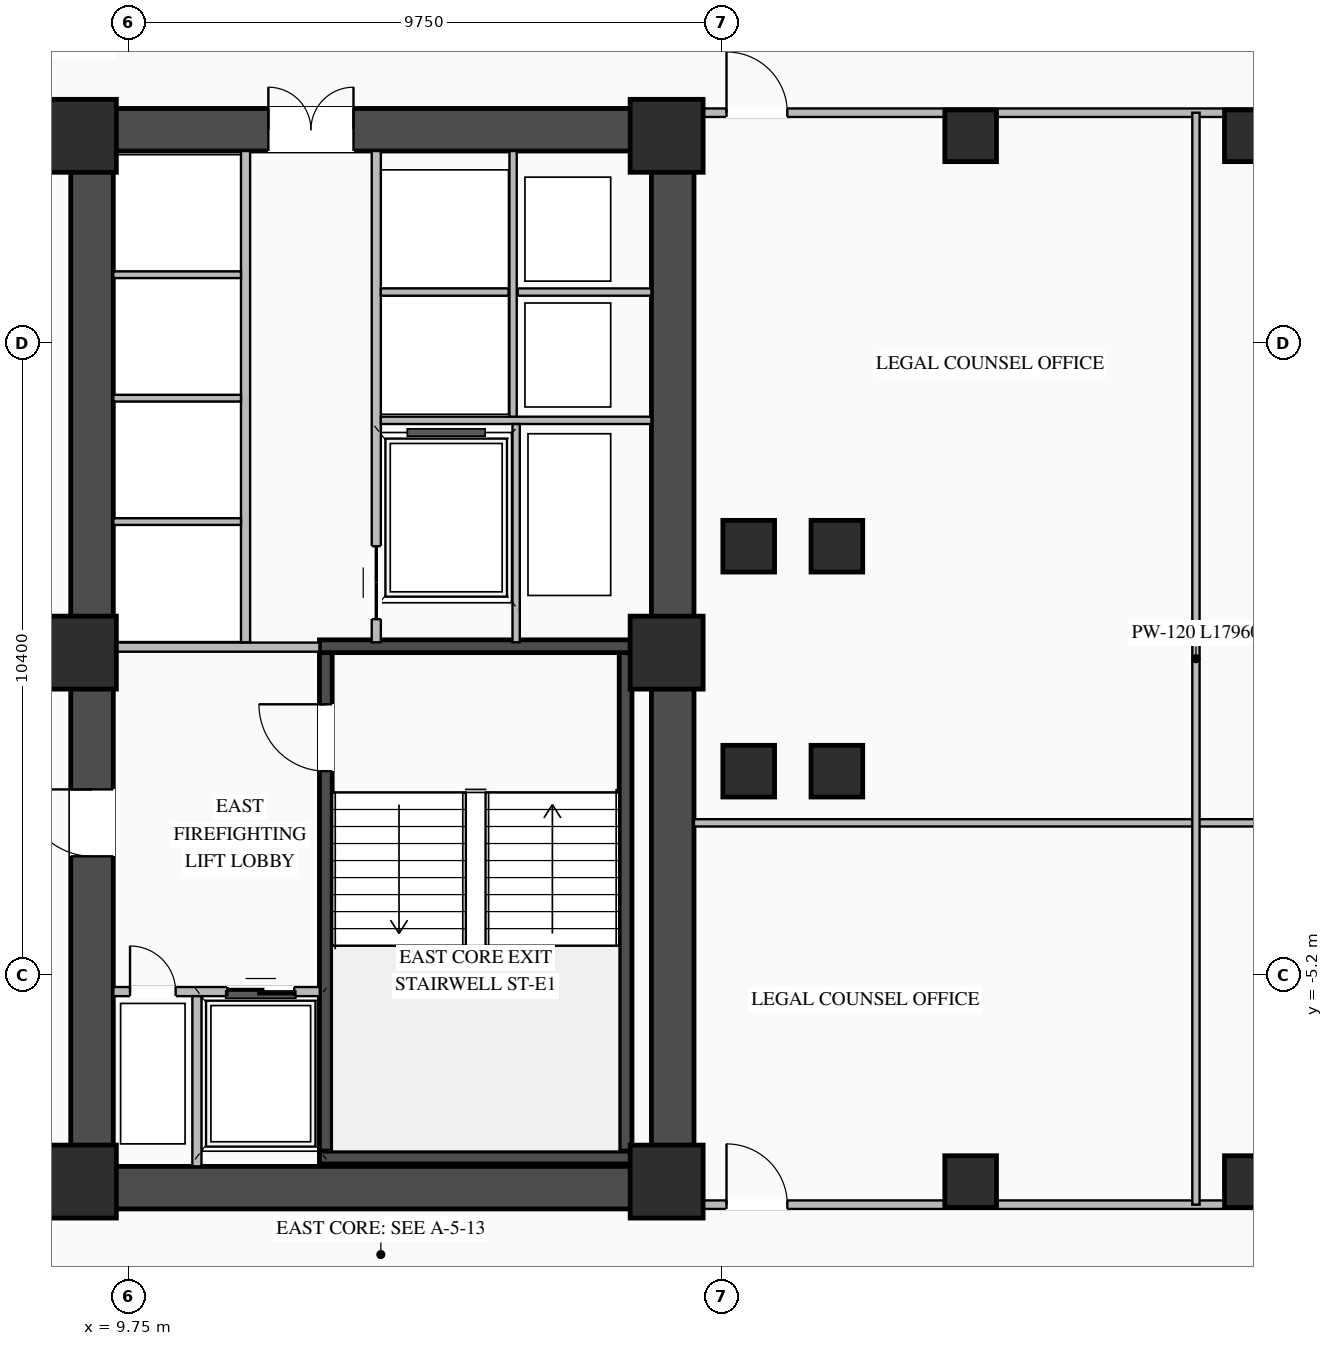
"""IFC4 building model, lengths in metres.
Left out: names, types, materials, properties, quantities, classifications, styles, units other than length and angle.
Written with IfcOpenShell. Run it as: python <this file> out.ifc"""

import sys

from ifc_helpers import new_model, si_unit, direction, frame, frame_2d, origin, origin_2d, place, context, subcontext, project, spatial, rectangle, i_section, extrude, element, fill, save


model = new_model("IFC4")
c1 = context("Model", 3, precision=1e-05, world=origin(), true_north=direction((0.0, 1.0)))
c2 = subcontext(c1, "Body", "Model", "MODEL_VIEW")
j1 = project(units=[si_unit("LENGTHUNIT", "METRE"), si_unit("PLANEANGLEUNIT", "RADIAN")], contexts=[c1])
p1 = place(None, origin())
s1 = spatial("IfcSite", under=j1, at=p1, CompositionType="ELEMENT")
p2 = place(p1, origin())
s2 = spatial("IfcBuilding", under=s1, at=p2, CompositionType="ELEMENT")
p3 = place(p2, frame((0.0, 0.0, 31.2)))
s3 = spatial("IfcBuildingStorey", under=s2, at=p3, CompositionType="ELEMENT", Elevation=31.2)
p4 = place(p3, frame((8.8, -8.7, 0.0), z_axis=(0.0, 0.0, 1.0), x_axis=(1.0, 0.0, 0.0)))
e1 = element("IfcWall", 1, at=p4, inside=s3, PredefinedType="SHEAR", context=c2, shape_type="SweptSolid", body=[
    extrude(rectangle(XDim=10.25, YDim=0.7, at=frame_2d((5.125, 0.0))), origin(), (0.0, 0.0, 1.0), 3.27),
])
p5 = place(p3, frame((8.8, 8.7, 0.0), z_axis=(0.0, 0.0, 1.0), x_axis=(1.0, 0.0, 0.0)))
e2 = element("IfcWall", 2, at=p5, inside=s3, PredefinedType="SHEAR", context=c2, shape_type="SweptSolid", body=[
    extrude(rectangle(XDim=10.25, YDim=0.7, at=frame_2d((5.125, 0.0))), origin(), (0.0, 0.0, 1.0), 3.27),
])
p6 = place(p5, frame((3.25, 0.0, 0.0)))
e3 = element("IfcOpeningElement", 3, at=p6, cuts=e2, PredefinedType="OPENING", context=c2, shape_type="SweptSolid", body=[
    extrude(rectangle(XDim=1.4, YDim=2.05, at=frame_2d((0.7, 1.025))), frame((0.0, 0.36, 0.0), z_axis=(0.0, -1.0, 0.0), x_axis=(1.0, 0.0, 0.0)), (0.0, 0.0, 1.0), 0.72),
])
p7 = place(p3, frame((9.15, -8.35, 0.0), z_axis=(0.0, 0.0, 1.0), x_axis=(0.0, 1.0, 0.0)))
e4 = element("IfcWall", 4, at=p7, inside=s3, PredefinedType="SHEAR", context=c2, shape_type="SweptSolid", body=[
    extrude(rectangle(XDim=16.7, YDim=0.7, at=frame_2d((8.35, 0.0))), origin(), (0.0, 0.0, 1.0), 3.27),
])
p8 = place(p7, frame((5.1, 0.0, 0.0)))
e5 = element("IfcOpeningElement", 5, at=p8, cuts=e4, PredefinedType="OPENING", context=c2, shape_type="SweptSolid", body=[
    extrude(rectangle(XDim=1.1, YDim=2.08, at=frame_2d((0.55, 1.04))), frame((0.0, 0.36, 0.0), z_axis=(0.0, -1.0, 0.0), x_axis=(1.0, 0.0, 0.0)), (0.0, 0.0, 1.0), 0.72),
])
p9 = place(p3, frame((18.7, -8.35, 0.0), z_axis=(0.0, 0.0, 1.0), x_axis=(0.0, 1.0, 0.0)))
e6 = element("IfcWall", 6, at=p9, inside=s3, PredefinedType="SHEAR", context=c2, shape_type="SweptSolid", body=[
    extrude(rectangle(XDim=16.7, YDim=0.7, at=frame_2d((8.35, 0.0))), origin(), (0.0, 0.0, 1.0), 3.27),
])
p10 = place(p3, frame((12.995, -8.1, 0.0), z_axis=(0.0, 0.0, 1.0), x_axis=(0.0, 1.0, 0.0)))
e7 = element("IfcWall", 7, at=p10, inside=s3, PredefinedType="SHEAR", context=c2, shape_type="SweptSolid", body=[
    extrude(rectangle(XDim=8.2, YDim=0.21, at=frame_2d((4.1, 0.0))), origin(), (0.0, 0.0, 1.0), 3.27),
])
p11 = place(p10, frame((6.25, 0.0, 0.0)))
e8 = element("IfcOpeningElement", 8, at=p11, cuts=e7, PredefinedType="OPENING", context=c2, shape_type="SweptSolid", body=[
    extrude(rectangle(XDim=1.1, YDim=2.15, at=frame_2d((0.55, 1.075))), frame((0.0, 0.115, 0.0), z_axis=(0.0, -1.0, 0.0), x_axis=(1.0, 0.0, 0.0)), (0.0, 0.0, 1.0), 0.23),
])
p12 = place(p3, frame((17.925, -8.1, 0.0), z_axis=(0.0, 0.0, 1.0), x_axis=(0.0, 1.0, 0.0)))
e9 = element("IfcWall", 9, at=p12, inside=s3, PredefinedType="SHEAR", context=c2, shape_type="SweptSolid", body=[
    extrude(rectangle(XDim=8.2, YDim=0.21, at=frame_2d((4.1, 0.0))), origin(), (0.0, 0.0, 1.0), 3.27),
])
for number, where, z_axis, x_axis in (
    (10, (12.89, -8.205, 0.0), (0.0, 0.0, 1.0), (1.0, 0.0, 0.0)),
    (11, (18.03, 0.205, 0.0), (0.0, 0.0, 1.0), (-1.0, 0.0, 0.0)),
):
    element("IfcWall", number, at=place(p3, frame(where, z_axis=z_axis, x_axis=x_axis)), inside=s3, PredefinedType="SHEAR", context=c2, shape_type="SweptSolid", body=[
        extrude(rectangle(XDim=5.14, YDim=0.21, at=frame_2d((2.57, 0.0))), origin(), (0.0, 0.0, 1.0), 3.27),
    ])
for number, where, z_axis, x_axis in (
    (12, (8.95, -8.6, 0.0), (0.0, 0.0, 1.0), (1.0, 0.0, 0.0)),
    (13, (8.95, 0.1, 0.0), (0.0, 0.0, 1.0), (1.0, 0.0, 0.0)),
    (14, (8.95, 8.6, 0.0), (0.0, 0.0, 1.0), (1.0, 0.0, 0.0)),
    (15, (18.6, -8.6, 0.0), (0.0, 0.0, 1.0), (1.0, 0.0, 0.0)),
    (16, (18.6, 0.1, 0.0), (0.0, 0.0, 1.0), (1.0, 0.0, 0.0)),
    (17, (18.6, 8.6, 0.0), (0.0, 0.0, 1.0), (1.0, 0.0, 0.0)),
):
    element("IfcColumn", number, at=place(p3, frame(where, z_axis=z_axis, x_axis=x_axis)), inside=s3, PredefinedType="COLUMN", context=c2, shape_type="SweptSolid", body=[
        extrude(rectangle(XDim=1.2, YDim=1.2, at=origin_2d()), origin(), (0.0, 0.0, 1.0), 3.45),
    ])
for number, where, z_axis, x_axis in (
    (18, (19.95, -1.85, 0.0), (0.0, 0.0, 1.0), (1.0, 0.0, 0.0)),
    (19, (19.95, 1.85, 0.0), (0.0, 0.0, 1.0), (1.0, 0.0, 0.0)),
    (20, (21.4, -1.85, 0.0), (0.0, 0.0, 1.0), (1.0, 0.0, 0.0)),
    (21, (21.4, 1.85, 0.0), (0.0, 0.0, 1.0), (1.0, 0.0, 0.0)),
    (22, (23.6, -8.6, 0.0), (0.0, 0.0, 1.0), (1.0, 0.0, 0.0)),
    (23, (23.6, 8.6, 0.0), (0.0, 0.0, 1.0), (1.0, 0.0, 0.0)),
    (24, (28.2, -8.6, 0.0), (0.0, 0.0, 1.0), (1.0, 0.0, 0.0)),
    (25, (28.2, 8.6, 0.0), (0.0, 0.0, 1.0), (1.0, 0.0, 0.0)),
):
    element("IfcColumn", number, at=place(p3, frame(where, z_axis=z_axis, x_axis=x_axis)), inside=s3, PredefinedType="COLUMN", context=c2, shape_type="SweptSolid", body=[
        extrude(i_section(OverallWidth=0.85, OverallDepth=0.85, WebThickness=0.032, FlangeThickness=0.048, at=origin_2d()), origin(), (0.0, 0.0, 1.0), 3.45),
    ])
p13 = place(p3, frame((9.5, -5.475, 0.0), z_axis=(0.0, 0.0, 1.0), x_axis=(1.0, 0.0, 0.0)))
e26 = element("IfcWall", 26, at=p13, inside=s3, PredefinedType="STANDARD", context=c2, shape_type="SweptSolid", body=[
    extrude(rectangle(XDim=3.395, YDim=0.15, at=frame_2d((1.698, 0.0))), origin(), (0.0, 0.0, 1.0), 3.25),
])
p14 = place(p13, frame((1.875, 0.0, 0.0)))
e27 = element("IfcOpeningElement", 27, at=p14, cuts=e26, PredefinedType="OPENING", context=c2, shape_type="SweptSolid", body=[
    extrude(rectangle(XDim=1.1, YDim=2.15, at=frame_2d((0.55, 1.075))), frame((0.0, 0.085, 0.0), z_axis=(0.0, -1.0, 0.0), x_axis=(1.0, 0.0, 0.0)), (0.0, 0.0, 1.0), 0.17),
])
p15 = place(p13, frame((0.275, 0.0, 0.0)))
e28 = element("IfcOpeningElement", 28, at=p15, cuts=e26, PredefinedType="OPENING", context=c2, shape_type="SweptSolid", body=[
    extrude(rectangle(XDim=0.75, YDim=2.05, at=frame_2d((0.375, 1.025))), frame((0.0, 0.085, 0.0), z_axis=(0.0, -1.0, 0.0), x_axis=(1.0, 0.0, 0.0)), (0.0, 0.0, 1.0), 0.17),
])
p16 = place(p3, frame((10.875, -8.35, 0.0), z_axis=(0.0, 0.0, 1.0), x_axis=(0.0, 1.0, 0.0)))
e29 = element("IfcWall", 29, at=p16, inside=s3, PredefinedType="STANDARD", context=c2, shape_type="SweptSolid", body=[
    extrude(rectangle(XDim=2.8, YDim=0.15, at=frame_2d((1.4, 0.0))), origin(), (0.0, 0.0, 1.0), 3.25),
])
p17 = place(p3, frame((9.5, 0.19, 0.0), z_axis=(0.0, 0.0, 1.0), x_axis=(1.0, 0.0, 0.0)))
e30 = element("IfcWall", 30, at=p17, inside=s3, PredefinedType="STANDARD", context=c2, shape_type="SweptSolid", body=[
    extrude(rectangle(XDim=3.39, YDim=0.15, at=frame_2d((1.695, 0.0))), origin(), (0.0, 0.0, 1.0), 2.645),
])
p18 = place(p3, frame((11.675, 0.27, 0.0), z_axis=(0.0, 0.0, 1.0), x_axis=(0.0, 1.0, 0.0)))
e31 = element("IfcWall", 31, at=p18, inside=s3, PredefinedType="STANDARD", context=c2, shape_type="SweptSolid", body=[
    extrude(rectangle(XDim=8.08, YDim=0.15, at=frame_2d((4.04, 0.0))), origin(), (0.0, 0.0, 1.0), 3.25),
])
for number, where, z_axis, x_axis in (
    (32, (9.5, 2.255, 0.0), (0.0, 0.0, 1.0), (1.0, 0.0, 0.0)),
    (33, (9.5, 4.285, 0.0), (0.0, 0.0, 1.0), (1.0, 0.0, 0.0)),
    (34, (9.5, 6.315, 0.0), (0.0, 0.0, 1.0), (1.0, 0.0, 0.0)),
):
    element("IfcWall", number, at=place(p3, frame(where, z_axis=z_axis, x_axis=x_axis)), inside=s3, PredefinedType="STANDARD", context=c2, shape_type="SweptSolid", body=[
        extrude(rectangle(XDim=2.1, YDim=0.11, at=frame_2d((1.05, 0.0))), origin(), (0.0, 0.0, 1.0), 3.25),
    ])
p19 = place(p3, frame((13.825, 0.27, 0.0), z_axis=(0.0, 0.0, 1.0), x_axis=(0.0, 1.0, 0.0)))
e35 = element("IfcWall", 35, at=p19, inside=s3, PredefinedType="STANDARD", context=c2, shape_type="SweptSolid", body=[
    extrude(rectangle(XDim=8.08, YDim=0.15, at=frame_2d((4.04, 0.0))), origin(), (0.0, 0.0, 1.0), 3.25),
])
p20 = place(p19, frame((0.38, 0.0, 0.0)))
e36 = element("IfcOpeningElement", 36, at=p20, cuts=e35, PredefinedType="OPENING", context=c2, shape_type="SweptSolid", body=[
    extrude(rectangle(XDim=1.2, YDim=2.1, at=frame_2d((0.6, 1.05))), frame((0.0, 0.085, 0.0), z_axis=(0.0, -1.0, 0.0), x_axis=(1.0, 0.0, 0.0)), (0.0, 0.0, 1.0), 0.17),
])
p21 = place(p3, frame((13.9, 3.92, 0.0), z_axis=(0.0, 0.0, 1.0), x_axis=(1.0, 0.0, 0.0)))
e37 = element("IfcWall", 37, at=p21, inside=s3, PredefinedType="STANDARD", context=c2, shape_type="SweptSolid", body=[
    extrude(rectangle(XDim=4.45, YDim=0.12, at=frame_2d((2.225, 0.0))), origin(), (0.0, 0.0, 1.0), 3.25),
])
p22 = place(p3, frame((16.15, 6.03, 0.0), z_axis=(0.0, 0.0, 1.0), x_axis=(1.0, 0.0, 0.0)))
e38 = element("IfcWall", 38, at=p22, inside=s3, PredefinedType="STANDARD", context=c2, shape_type="SweptSolid", body=[
    extrude(rectangle(XDim=2.2, YDim=0.12, at=frame_2d((1.1, 0.0))), origin(), (0.0, 0.0, 1.0), 3.25),
])
p23 = place(p3, frame((16.075, 3.98, 0.0), z_axis=(0.0, 0.0, 1.0), x_axis=(0.0, 1.0, 0.0)))
e39 = element("IfcWall", 39, at=p23, inside=s3, PredefinedType="STANDARD", context=c2, shape_type="SweptSolid", body=[
    extrude(rectangle(XDim=4.37, YDim=0.12, at=frame_2d((2.185, 0.0))), origin(), (0.0, 0.0, 1.0), 3.25),
])
p24 = place(p3, frame((13.9, 6.03, 0.0), z_axis=(0.0, 0.0, 1.0), x_axis=(1.0, 0.0, 0.0)))
e40 = element("IfcWall", 40, at=p24, inside=s3, PredefinedType="STANDARD", context=c2, shape_type="SweptSolid", body=[
    extrude(rectangle(XDim=2.1, YDim=0.12, at=frame_2d((1.05, 0.0))), origin(), (0.0, 0.0, 1.0), 3.25),
])
p25 = place(p3, frame((16.125, 0.27, 0.0), z_axis=(0.0, 0.0, 1.0), x_axis=(0.0, 1.0, 0.0)))
e41 = element("IfcWall", 41, at=p25, inside=s3, PredefinedType="STANDARD", context=c2, shape_type="SweptSolid", body=[
    extrude(rectangle(XDim=3.59, YDim=0.12, at=frame_2d((1.795, 0.0))), origin(), (0.0, 0.0, 1.0), 3.25),
])
p26 = place(p3, frame((19.05, 8.98, 0.0), z_axis=(0.0, 0.0, 1.0), x_axis=(1.0, 0.0, 0.0)))
e42 = element("IfcWall", 42, at=p26, inside=s3, PredefinedType="STANDARD", context=c2, shape_type="SweptSolid", body=[
    extrude(rectangle(XDim=16.57, YDim=0.14, at=frame_2d((8.285, 0.0))), origin(), (0.0, 0.0, 1.0), 3.25),
])
p27 = place(p26, frame((0.535, 0.0, 0.0)))
e43 = element("IfcOpeningElement", 43, at=p27, cuts=e42, PredefinedType="OPENING", context=c2, shape_type="SweptSolid", body=[
    extrude(rectangle(XDim=1.0, YDim=2.08, at=frame_2d((0.5, 1.04))), frame((0.0, 0.08, 0.0), z_axis=(0.0, -1.0, 0.0), x_axis=(1.0, 0.0, 0.0)), (0.0, 0.0, 1.0), 0.16),
])
p28 = place(p26, frame((11.782, 0.0, 0.0)))
e44 = element("IfcOpeningElement", 44, at=p28, cuts=e42, PredefinedType="OPENING", context=c2, shape_type="SweptSolid", body=[
    extrude(rectangle(XDim=1.0, YDim=2.08, at=frame_2d((0.5, 1.04))), frame((0.0, 0.08, 0.0), z_axis=(0.0, -1.0, 0.0), x_axis=(1.0, 0.0, 0.0)), (0.0, 0.0, 1.0), 0.16),
])
p29 = place(p3, frame((19.05, -8.98, 0.0), z_axis=(0.0, 0.0, 1.0), x_axis=(1.0, 0.0, 0.0)))
e45 = element("IfcWall", 45, at=p29, inside=s3, PredefinedType="STANDARD", context=c2, shape_type="SweptSolid", body=[
    extrude(rectangle(XDim=16.57, YDim=0.14, at=frame_2d((8.285, 0.0))), origin(), (0.0, 0.0, 1.0), 3.25),
])
p30 = place(p29, frame((0.535, 0.0, 0.0)))
e46 = element("IfcOpeningElement", 46, at=p30, cuts=e45, PredefinedType="OPENING", context=c2, shape_type="SweptSolid", body=[
    extrude(rectangle(XDim=1.0, YDim=2.08, at=frame_2d((0.5, 1.04))), frame((0.0, 0.08, 0.0), z_axis=(0.0, -1.0, 0.0), x_axis=(1.0, 0.0, 0.0)), (0.0, 0.0, 1.0), 0.16),
])
p31 = place(p29, frame((11.782, 0.0, 0.0)))
e47 = element("IfcOpeningElement", 47, at=p31, cuts=e45, PredefinedType="OPENING", context=c2, shape_type="SweptSolid", body=[
    extrude(rectangle(XDim=1.0, YDim=2.08, at=frame_2d((0.5, 1.04))), frame((0.0, 0.08, 0.0), z_axis=(0.0, -1.0, 0.0), x_axis=(1.0, 0.0, 0.0)), (0.0, 0.0, 1.0), 0.16),
])
p32 = place(p3, frame((19.05, -2.7, 0.0), z_axis=(0.0, 0.0, 1.0), x_axis=(1.0, 0.0, 0.0)))
e48 = element("IfcWall", 48, at=p32, inside=s3, PredefinedType="STANDARD", context=c2, shape_type="SweptSolid", body=[
    extrude(rectangle(XDim=16.57, YDim=0.12, at=frame_2d((8.285, 0.0))), origin(), (0.0, 0.0, 1.0), 3.25),
])
p33 = place(p3, frame((27.305, -8.98, 0.0), z_axis=(0.0, 0.0, 1.0), x_axis=(0.0, 1.0, 0.0)))
e49 = element("IfcWall", 49, at=p33, inside=s3, PredefinedType="STANDARD", context=c2, shape_type="SweptSolid", body=[
    extrude(rectangle(XDim=17.96, YDim=0.12, at=frame_2d((8.98, 0.0))), origin(), (0.0, 0.0, 1.0), 3.25),
])
p34 = place(p11, origin())
e50 = element("IfcDoor", 50, at=p34, inside=s3, OperationType="SINGLE_SWING_RIGHT", PredefinedType="DOOR", context=c2, shape_type="SweptSolid", body=[
    extrude(rectangle(XDim=1.1, YDim=2.15, at=frame_2d((0.55, 1.075))), frame((0.0, 0.025, 0.0), z_axis=(0.0, -1.0, 0.0), x_axis=(1.0, 0.0, 0.0)), (0.0, 0.0, 1.0), 0.05),
])
fill(e8, e50)
p35 = place(p14, origin())
e51 = element("IfcDoor", 51, at=p35, inside=s3, OperationType="DOUBLE_DOOR_SLIDING", PredefinedType="DOOR", context=c2, shape_type="SweptSolid", body=[
    extrude(rectangle(XDim=1.1, YDim=2.15, at=frame_2d((0.55, 1.075))), frame((0.0, 0.025, 0.0), z_axis=(0.0, -1.0, 0.0), x_axis=(1.0, 0.0, 0.0)), (0.0, 0.0, 1.0), 0.05),
])
fill(e27, e51)
p36 = place(p15, origin())
e52 = element("IfcDoor", 52, at=p36, inside=s3, OperationType="SINGLE_SWING_LEFT", PredefinedType="DOOR", context=c2, shape_type="SweptSolid", body=[
    extrude(rectangle(XDim=0.75, YDim=2.05, at=frame_2d((0.375, 1.025))), frame((0.0, 0.025, 0.0), z_axis=(0.0, -1.0, 0.0), x_axis=(1.0, 0.0, 0.0)), (0.0, 0.0, 1.0), 0.05),
])
fill(e28, e52)
p37 = place(p8, origin())
e53 = element("IfcDoor", 53, at=p37, inside=s3, OperationType="SINGLE_SWING_RIGHT", PredefinedType="DOOR", context=c2, shape_type="SweptSolid", body=[
    extrude(rectangle(XDim=1.1, YDim=2.08, at=frame_2d((0.55, 1.04))), frame((0.0, -0.255, 0.0), z_axis=(0.0, -1.0, 0.0), x_axis=(1.0, 0.0, 0.0)), (0.0, 0.0, 1.0), 0.05),
])
fill(e5, e53)
p38 = place(p6, origin())
e54 = element("IfcDoor", 54, at=p38, inside=s3, OperationType="DOUBLE_DOOR_SINGLE_SWING", PredefinedType="DOOR", context=c2, shape_type="SweptSolid", body=[
    extrude(rectangle(XDim=1.4, YDim=2.05, at=frame_2d((0.7, 1.025))), frame((0.0, 0.295, 0.0), z_axis=(0.0, -1.0, 0.0), x_axis=(1.0, 0.0, 0.0)), (0.0, 0.0, 1.0), 0.05),
])
fill(e3, e54)
p39 = place(p20, origin())
e55 = element("IfcDoor", 55, at=p39, inside=s3, OperationType="DOUBLE_DOOR_SLIDING", PredefinedType="DOOR", context=c2, shape_type="SweptSolid", body=[
    extrude(rectangle(XDim=1.2, YDim=2.1, at=frame_2d((0.6, 1.05))), frame((0.0, 0.025, 0.0), z_axis=(0.0, -1.0, 0.0), x_axis=(1.0, 0.0, 0.0)), (0.0, 0.0, 1.0), 0.05),
])
fill(e36, e55)
p40 = place(p27, origin())
e56 = element("IfcDoor", 56, at=p40, inside=s3, OperationType="SINGLE_SWING_LEFT", PredefinedType="DOOR", context=c2, shape_type="SweptSolid", body=[
    extrude(rectangle(XDim=1.0, YDim=2.08, at=frame_2d((0.5, 1.04))), frame((0.0, 0.025, 0.0), z_axis=(0.0, -1.0, 0.0), x_axis=(1.0, 0.0, 0.0)), (0.0, 0.0, 1.0), 0.05),
])
fill(e43, e56)
p41 = place(p30, origin())
e57 = element("IfcDoor", 57, at=p41, inside=s3, OperationType="SINGLE_SWING_LEFT", PredefinedType="DOOR", context=c2, shape_type="SweptSolid", body=[
    extrude(rectangle(XDim=1.0, YDim=2.08, at=frame_2d((0.5, 1.04))), frame((0.0, 0.025, 0.0), z_axis=(0.0, -1.0, 0.0), x_axis=(1.0, 0.0, 0.0)), (0.0, 0.0, 1.0), 0.05),
])
fill(e46, e57)
save(model, sys.argv[1])
